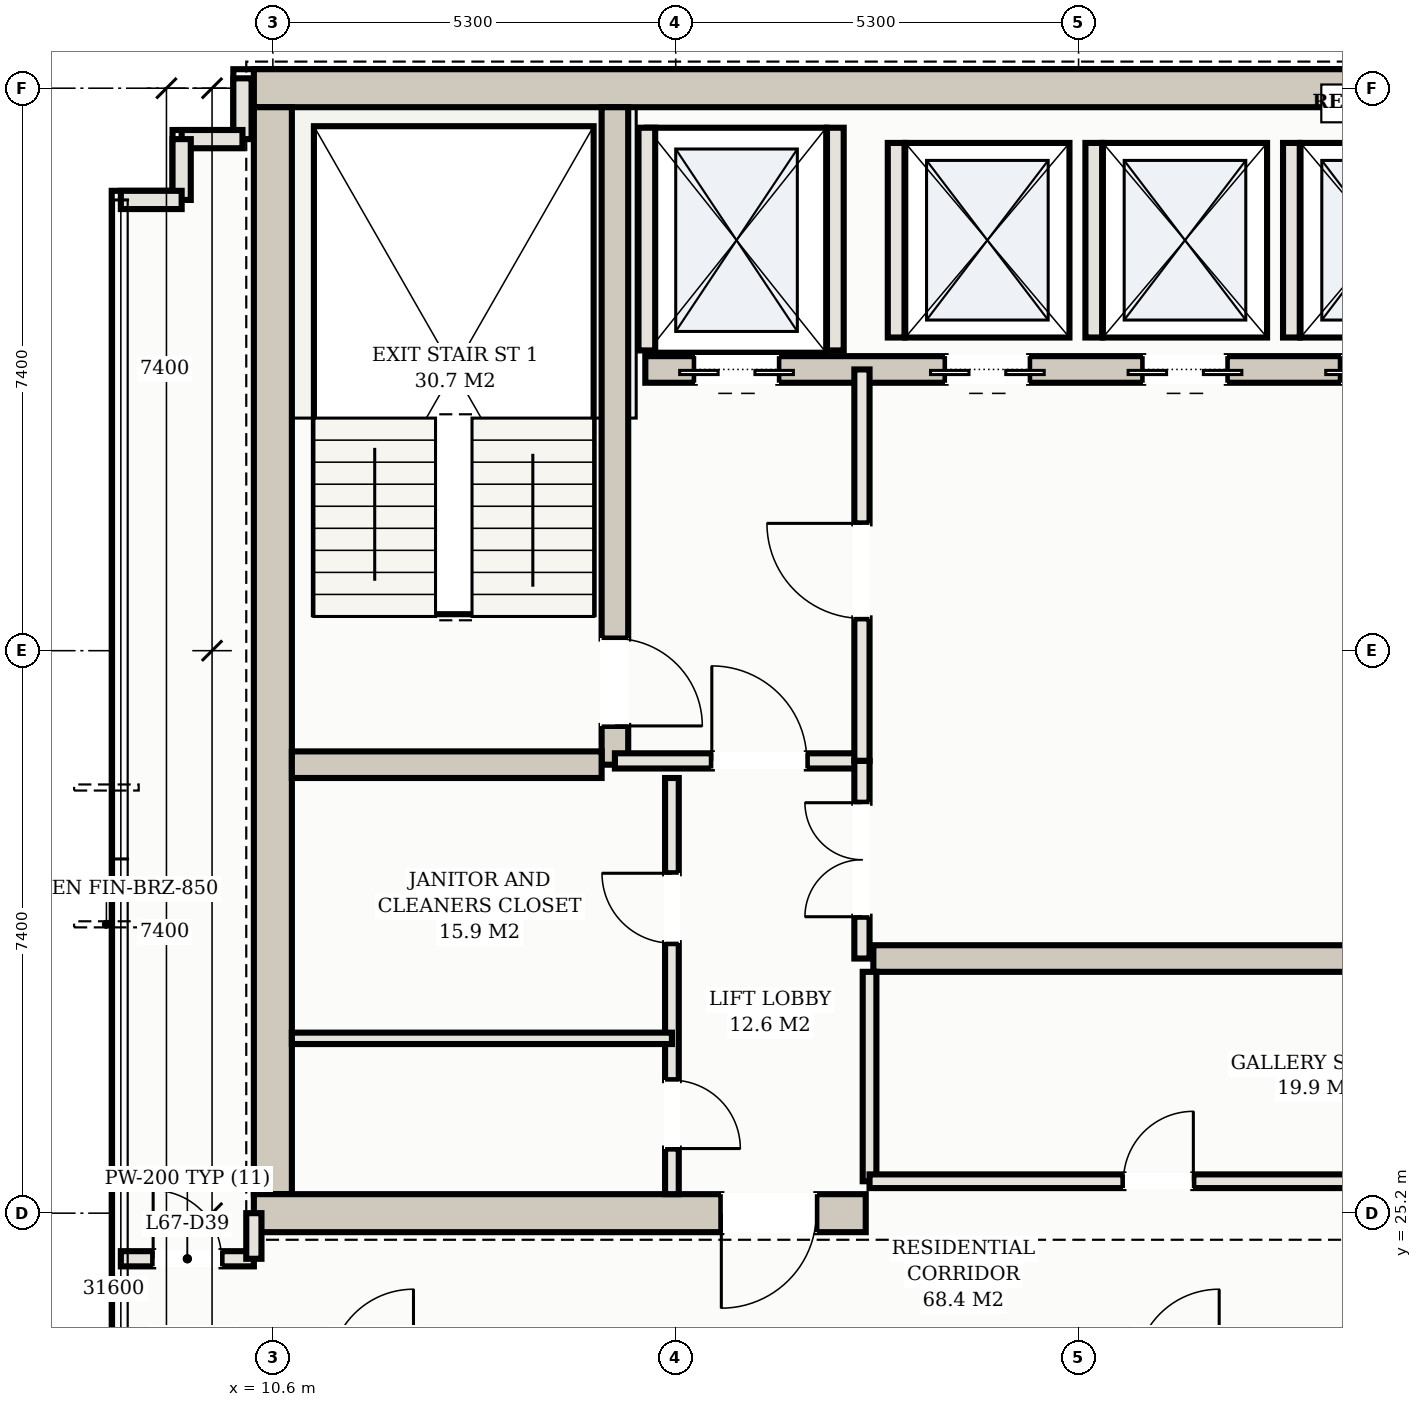
"""IFC4 building model, lengths in metres.
Left out: names, types, materials, properties, quantities, classifications, styles, units other than length and angle.
Written with IfcOpenShell. Run it as: python <this file> out.ifc"""

import sys

from ifc_helpers import new_model, si_unit, direction, frame, frame_2d, origin, place, context, subcontext, project, spatial, rectangle, extrude, element, fill, save


model = new_model("IFC4")
c1 = context("Model", 3, precision=1e-05, world=origin(), true_north=direction((0.0, 1.0)))
c2 = subcontext(c1, "Body", "Model", "MODEL_VIEW")
j1 = project(units=[si_unit("LENGTHUNIT", "METRE"), si_unit("PLANEANGLEUNIT", "RADIAN")], contexts=[c1])
p1 = place(None, origin())
s1 = spatial("IfcSite", under=j1, at=p1, CompositionType="ELEMENT")
p2 = place(p1, origin())
s2 = spatial("IfcBuilding", under=s1, at=p2, CompositionType="ELEMENT")
p3 = place(p2, frame((0.0, 0.0, 242.9)))
s3 = spatial("IfcBuildingStorey", under=s2, at=p3, CompositionType="ELEMENT", Elevation=242.9)
p4 = place(p3, frame((10.35, 40.0, 0.0), z_axis=(0.0, 0.0, 1.0), x_axis=(1.0, 0.0, 0.0)))
e1 = element("IfcWall", 1, at=p4, inside=s3, PredefinedType="SHEAR", context=c2, shape_type="SweptSolid", body=[
    extrude(rectangle(XDim=32.3, YDim=0.5, at=frame_2d((16.15, 0.0))), origin(), (0.0, 0.0, 1.0), 3.11),
])
p5 = place(p3, frame((10.6, 25.45, 0.0), z_axis=(0.0, 0.0, 1.0), x_axis=(0.0, 1.0, 0.0)))
e2 = element("IfcWall", 2, at=p5, inside=s3, PredefinedType="SHEAR", context=c2, shape_type="SweptSolid", body=[
    extrude(rectangle(XDim=14.3, YDim=0.5, at=frame_2d((7.15, 0.0))), origin(), (0.0, 0.0, 1.0), 3.11),
])
p6 = place(p3, frame((10.35, 25.2, 0.0), z_axis=(0.0, 0.0, 1.0), x_axis=(1.0, 0.0, 0.0)))
e3 = element("IfcWall", 3, at=p6, inside=s3, PredefinedType="SHEAR", context=c2, shape_type="SweptSolid", body=[
    extrude(rectangle(XDim=8.05, YDim=0.5, at=frame_2d((4.025, 0.0))), origin(), (0.0, 0.0, 1.0), 3.11),
])
p7 = place(p6, frame((6.15, 0.0, 0.0)))
e4 = element("IfcOpeningElement", 4, at=p7, cuts=e3, PredefinedType="OPENING", context=c2, shape_type="SweptSolid", body=[
    extrude(rectangle(XDim=1.25, YDim=2.2, at=frame_2d((0.625, 1.1))), frame((0.0, 0.26, 0.0), z_axis=(0.0, -1.0, 0.0), x_axis=(1.0, 0.0, 0.0)), (0.0, 0.0, 1.0), 0.52),
])
p8 = place(p3, frame((15.1, 31.1, 0.0), z_axis=(0.0, 0.0, 1.0), x_axis=(0.0, 1.0, 0.0)))
e5 = element("IfcWall", 5, at=p8, inside=s3, PredefinedType="SHEAR", context=c2, shape_type="SweptSolid", body=[
    extrude(rectangle(XDim=8.65, YDim=0.35, at=frame_2d((4.325, 0.0))), origin(), (0.0, 0.0, 1.0), 3.11),
])
p9 = place(p8, frame((0.51, 0.0, 0.0)))
e6 = element("IfcOpeningElement", 6, at=p9, cuts=e5, PredefinedType="OPENING", context=c2, shape_type="SweptSolid", body=[
    extrude(rectangle(XDim=1.15, YDim=2.2, at=frame_2d((0.575, 1.1))), frame((0.0, 0.185, 0.0), z_axis=(0.0, -1.0, 0.0), x_axis=(1.0, 0.0, 0.0)), (0.0, 0.0, 1.0), 0.37),
])
p10 = place(p3, frame((10.85, 31.1, 0.0), z_axis=(0.0, 0.0, 1.0), x_axis=(1.0, 0.0, 0.0)))
e7 = element("IfcWall", 7, at=p10, inside=s3, PredefinedType="SHEAR", context=c2, shape_type="SweptSolid", body=[
    extrude(rectangle(XDim=4.075, YDim=0.35, at=frame_2d((2.038, 0.0))), origin(), (0.0, 0.0, 1.0), 3.11),
])
p11 = place(p3, frame((15.5, 36.3, 0.0), z_axis=(0.0, 0.0, 1.0), x_axis=(1.0, 0.0, 0.0)))
e8 = element("IfcWall", 8, at=p11, inside=s3, PredefinedType="SHEAR", context=c2, shape_type="SweptSolid", body=[
    extrude(rectangle(XDim=22.0, YDim=0.35, at=frame_2d((11.0, 0.0))), origin(), (0.0, 0.0, 1.0), 3.11),
])
p12 = place(p11, frame((0.65, 0.0, 0.0)))
e9 = element("IfcOpeningElement", 9, at=p12, cuts=e8, PredefinedType="OPENING", context=c2, shape_type="SweptSolid", body=[
    extrude(rectangle(XDim=1.1, YDim=2.15, at=frame_2d((0.55, 1.075))), frame((0.0, 0.185, 0.0), z_axis=(0.0, -1.0, 0.0), x_axis=(1.0, 0.0, 0.0)), (0.0, 0.0, 1.0), 0.37),
])
p13 = place(p11, frame((20.25, 0.0, 0.0)))
e10 = element("IfcOpeningElement", 10, at=p13, cuts=e8, PredefinedType="OPENING", context=c2, shape_type="SweptSolid", body=[
    extrude(rectangle(XDim=1.1, YDim=2.15, at=frame_2d((0.55, 1.075))), frame((0.0, 0.185, 0.0), z_axis=(0.0, -1.0, 0.0), x_axis=(1.0, 0.0, 0.0)), (0.0, 0.0, 1.0), 0.37),
])
p14 = place(p11, frame((17.05, 0.0, 0.0)))
e11 = element("IfcOpeningElement", 11, at=p14, cuts=e8, PredefinedType="OPENING", context=c2, shape_type="SweptSolid", body=[
    extrude(rectangle(XDim=1.3, YDim=2.2, at=frame_2d((0.65, 1.1))), frame((0.0, 0.185, 0.0), z_axis=(0.0, -1.0, 0.0), x_axis=(1.0, 0.0, 0.0)), (0.0, 0.0, 1.0), 0.37),
])
p15 = place(p11, frame((3.95, 0.0, 0.0)))
e12 = element("IfcOpeningElement", 12, at=p15, cuts=e8, PredefinedType="OPENING", context=c2, shape_type="SweptSolid", body=[
    extrude(rectangle(XDim=1.1, YDim=2.15, at=frame_2d((0.55, 1.075))), frame((0.0, 0.185, 0.0), z_axis=(0.0, -1.0, 0.0), x_axis=(1.0, 0.0, 0.0)), (0.0, 0.0, 1.0), 0.37),
])
p16 = place(p11, frame((6.55, 0.0, 0.0)))
e13 = element("IfcOpeningElement", 13, at=p16, cuts=e8, PredefinedType="OPENING", context=c2, shape_type="SweptSolid", body=[
    extrude(rectangle(XDim=1.1, YDim=2.15, at=frame_2d((0.55, 1.075))), frame((0.0, 0.185, 0.0), z_axis=(0.0, -1.0, 0.0), x_axis=(1.0, 0.0, 0.0)), (0.0, 0.0, 1.0), 0.37),
])
p17 = place(p11, frame((9.15, 0.0, 0.0)))
e14 = element("IfcOpeningElement", 14, at=p17, cuts=e8, PredefinedType="OPENING", context=c2, shape_type="SweptSolid", body=[
    extrude(rectangle(XDim=1.1, YDim=2.15, at=frame_2d((0.55, 1.075))), frame((0.0, 0.185, 0.0), z_axis=(0.0, -1.0, 0.0), x_axis=(1.0, 0.0, 0.0)), (0.0, 0.0, 1.0), 0.37),
])
p18 = place(p3, frame((18.5, 28.55, 0.0), z_axis=(0.0, 0.0, 1.0), x_axis=(1.0, 0.0, 0.0)))
e15 = element("IfcWall", 15, at=p18, inside=s3, PredefinedType="SHEAR", context=c2, shape_type="SweptSolid", body=[
    extrude(rectangle(XDim=16.0, YDim=0.35, at=frame_2d((8.0, 0.0))), origin(), (0.0, 0.0, 1.0), 3.11),
])
for number, where, z_axis, x_axis in (
    (16, (15.52, 36.55, 0.0), (0.0, 0.0, 1.0), (0.0, 1.0, 0.0)),
    (17, (18.0, 36.55, 0.0), (0.0, 0.0, 1.0), (0.0, 1.0, 0.0)),
):
    element("IfcWall", number, at=place(p3, frame(where, z_axis=z_axis, x_axis=x_axis)), inside=s3, PredefinedType="SOLIDWALL", context=c2, shape_type="SweptSolid", body=[
        extrude(rectangle(XDim=2.93, YDim=0.22, at=frame_2d((1.465, 0.0))), origin(), (0.0, 0.0, 1.0), 3.11),
    ])
for number, where, z_axis, x_axis in (
    (18, (18.8, 36.72, 0.0), (0.0, 0.0, 1.0), (0.0, 1.0, 0.0)),
    (19, (21.4, 36.72, 0.0), (0.0, 0.0, 1.0), (0.0, 1.0, 0.0)),
    (20, (24.0, 36.72, 0.0), (0.0, 0.0, 1.0), (0.0, 1.0, 0.0)),
):
    element("IfcWall", number, at=place(p3, frame(where, z_axis=z_axis, x_axis=x_axis)), inside=s3, PredefinedType="SOLIDWALL", context=c2, shape_type="SweptSolid", body=[
        extrude(rectangle(XDim=2.56, YDim=0.22, at=frame_2d((1.28, 0.0))), origin(), (0.0, 0.0, 1.0), 3.11),
    ])
p19 = place(p3, frame((10.2, 40.13, 0.0), z_axis=(0.0, 0.0, 1.0), x_axis=(0.0, -1.0, 0.0)))
e21 = element("IfcWall", 21, at=p19, inside=s3, PredefinedType="SOLIDWALL", context=c2, shape_type="SweptSolid", body=[
    extrude(rectangle(XDim=0.8, YDim=0.24, at=frame_2d((0.4, 0.0))), origin(), (0.0, 0.0, 1.0), 3.11),
])
for number, where, z_axis, x_axis in (
    (22, (10.2, 39.33, 0.0), (0.0, 0.0, 1.0), (-1.0, 0.0, 0.0)),
    (23, (9.4, 39.33, 0.0), (0.0, 0.0, 1.0), (0.0, -1.0, 0.0)),
):
    element("IfcWall", number, at=place(p3, frame(where, z_axis=z_axis, x_axis=x_axis)), inside=s3, PredefinedType="SOLIDWALL", context=c2, shape_type="SweptSolid", body=[
        extrude(rectangle(XDim=0.8, YDim=0.24, at=frame_2d((0.4, 0.0))), origin(), (0.0, 0.0, 1.0), 3.11),
    ])
p20 = place(p3, frame((9.4, 38.53, 0.0), z_axis=(0.0, 0.0, 1.0), x_axis=(-1.0, 0.0, 0.0)))
e24 = element("IfcWall", 24, at=p20, inside=s3, PredefinedType="SOLIDWALL", context=c2, shape_type="SweptSolid", body=[
    extrude(rectangle(XDim=0.8, YDim=0.24, at=frame_2d((0.4, 0.0))), origin(), (0.0, 0.0, 1.0), 3.11),
])
p21 = place(p3, frame((15.1, 31.15, 0.0), z_axis=(0.0, 0.0, 1.0), x_axis=(1.0, 0.0, 0.0)))
e25 = element("IfcWall", 25, at=p21, inside=s3, PredefinedType="PARTITIONING", context=c2, shape_type="SweptSolid", body=[
    extrude(rectangle(XDim=3.25, YDim=0.2, at=frame_2d((1.625, 0.0))), origin(), (0.0, 0.0, 1.0), 2.45),
])
p22 = place(p21, frame((1.275, 0.0, 0.0)))
e26 = element("IfcOpeningElement", 26, at=p22, cuts=e25, PredefinedType="OPENING", context=c2, shape_type="SweptSolid", body=[
    extrude(rectangle(XDim=1.25, YDim=2.2, at=frame_2d((0.625, 1.1))), frame((0.0, 0.11, 0.0), z_axis=(0.0, -1.0, 0.0), x_axis=(1.0, 0.0, 0.0)), (0.0, 0.0, 1.0), 0.22),
])
p23 = place(p3, frame((18.35, 31.15, 0.0), z_axis=(0.0, 0.0, 1.0), x_axis=(0.0, 1.0, 0.0)))
e27 = element("IfcWall", 27, at=p23, inside=s3, PredefinedType="PARTITIONING", context=c2, shape_type="SweptSolid", body=[
    extrude(rectangle(XDim=5.15, YDim=0.2, at=frame_2d((2.575, 0.0))), origin(), (0.0, 0.0, 1.0), 2.45),
])
p24 = place(p23, frame((1.875, 0.0, 0.0)))
e28 = element("IfcOpeningElement", 28, at=p24, cuts=e27, PredefinedType="OPENING", context=c2, shape_type="SweptSolid", body=[
    extrude(rectangle(XDim=1.25, YDim=2.2, at=frame_2d((0.625, 1.1))), frame((0.0, 0.11, 0.0), z_axis=(0.0, -1.0, 0.0), x_axis=(1.0, 0.0, 0.0)), (0.0, 0.0, 1.0), 0.22),
])
p25 = place(p3, frame((15.85, 25.45, 0.0), z_axis=(0.0, 0.0, 1.0), x_axis=(0.0, 1.0, 0.0)))
e29 = element("IfcWall", 29, at=p25, inside=s3, PredefinedType="PARTITIONING", context=c2, shape_type="SweptSolid", body=[
    extrude(rectangle(XDim=5.475, YDim=0.18, at=frame_2d((2.738, 0.0))), origin(), (0.0, 0.0, 1.0), 2.45),
])
p26 = place(p25, frame((0.6, 0.0, 0.0)))
e30 = element("IfcOpeningElement", 30, at=p26, cuts=e29, PredefinedType="OPENING", context=c2, shape_type="SweptSolid", body=[
    extrude(rectangle(XDim=0.9, YDim=2.15, at=frame_2d((0.45, 1.075))), frame((0.0, 0.1, 0.0), z_axis=(0.0, -1.0, 0.0), x_axis=(1.0, 0.0, 0.0)), (0.0, 0.0, 1.0), 0.2),
])
p27 = place(p25, frame((3.302, 0.0, 0.0)))
e31 = element("IfcOpeningElement", 31, at=p27, cuts=e29, PredefinedType="OPENING", context=c2, shape_type="SweptSolid", body=[
    extrude(rectangle(XDim=0.92, YDim=2.15, at=frame_2d((0.46, 1.075))), frame((0.0, 0.1, 0.0), z_axis=(0.0, -1.0, 0.0), x_axis=(1.0, 0.0, 0.0)), (0.0, 0.0, 1.0), 0.2),
])
p28 = place(p3, frame((10.85, 27.5, 0.0), z_axis=(0.0, 0.0, 1.0), x_axis=(1.0, 0.0, 0.0)))
e32 = element("IfcWall", 32, at=p28, inside=s3, PredefinedType="PARTITIONING", context=c2, shape_type="SweptSolid", body=[
    extrude(rectangle(XDim=5.0, YDim=0.15, at=frame_2d((2.5, 0.0))), origin(), (0.0, 0.0, 1.0), 2.45),
])
p29 = place(p3, frame((18.35, 28.55, 0.0), z_axis=(0.0, 0.0, 1.0), x_axis=(0.0, 1.0, 0.0)))
e33 = element("IfcWall", 33, at=p29, inside=s3, PredefinedType="PARTITIONING", context=c2, shape_type="SweptSolid", body=[
    extrude(rectangle(XDim=2.6, YDim=0.2, at=frame_2d((1.3, 0.0))), origin(), (0.0, 0.0, 1.0), 2.45),
])
p30 = place(p29, frame((0.55, 0.0, 0.0)))
e34 = element("IfcOpeningElement", 34, at=p30, cuts=e33, PredefinedType="OPENING", context=c2, shape_type="SweptSolid", body=[
    extrude(rectangle(XDim=1.5, YDim=2.25, at=frame_2d((0.75, 1.125))), frame((0.0, 0.11, 0.0), z_axis=(0.0, -1.0, 0.0), x_axis=(1.0, 0.0, 0.0)), (0.0, 0.0, 1.0), 0.22),
])
p31 = place(p3, frame((18.45, 25.62, 0.0), z_axis=(0.0, 0.0, 1.0), x_axis=(0.0, 1.0, 0.0)))
e35 = element("IfcWall", 35, at=p31, inside=s3, PredefinedType="PARTITIONING", context=c2, shape_type="SweptSolid", body=[
    extrude(rectangle(XDim=2.755, YDim=0.18, at=frame_2d((1.377, 0.0))), origin(), (0.0, 0.0, 1.0), 2.45),
])
p32 = place(p3, frame((18.45, 25.62, 0.0), z_axis=(0.0, 0.0, 1.0), x_axis=(1.0, 0.0, 0.0)))
e36 = element("IfcWall", 36, at=p32, inside=s3, PredefinedType="PARTITIONING", context=c2, shape_type="SweptSolid", body=[
    extrude(rectangle(XDim=7.9, YDim=0.18, at=frame_2d((3.95, 0.0))), origin(), (0.0, 0.0, 1.0), 2.45),
])
p33 = place(p32, frame((3.34, 0.0, 0.0)))
e37 = element("IfcOpeningElement", 37, at=p33, cuts=e36, PredefinedType="OPENING", context=c2, shape_type="SweptSolid", body=[
    extrude(rectangle(XDim=0.92, YDim=2.15, at=frame_2d((0.46, 1.075))), frame((0.0, 0.1, 0.0), z_axis=(0.0, -1.0, 0.0), x_axis=(1.0, 0.0, 0.0)), (0.0, 0.0, 1.0), 0.2),
])
p34 = place(p3, frame((8.6, 24.6, 0.0), z_axis=(0.0, 0.0, 1.0), x_axis=(1.0, 0.0, 0.0)))
e38 = element("IfcWall", 38, at=p34, inside=s3, PredefinedType="PARTITIONING", context=c2, shape_type="SweptSolid", body=[
    extrude(rectangle(XDim=1.75, YDim=0.2, at=frame_2d((0.875, 0.0))), origin(), (0.0, 0.0, 1.0), 2.45),
])
p35 = place(p34, frame((0.425, 0.0, 0.0)))
e39 = element("IfcOpeningElement", 39, at=p35, cuts=e38, PredefinedType="OPENING", context=c2, shape_type="SweptSolid", body=[
    extrude(rectangle(XDim=0.9, YDim=2.15, at=frame_2d((0.45, 1.075))), frame((0.0, 0.11, 0.0), z_axis=(0.0, -1.0, 0.0), x_axis=(1.0, 0.0, 0.0)), (0.0, 0.0, 1.0), 0.22),
])
p36 = place(p3, frame((10.35, 24.6, 0.0), z_axis=(0.0, 0.0, 1.0), x_axis=(0.0, 1.0, 0.0)))
e40 = element("IfcWall", 40, at=p36, inside=s3, PredefinedType="PARTITIONING", context=c2, shape_type="SweptSolid", body=[
    extrude(rectangle(XDim=0.6, YDim=0.2, at=frame_2d((0.3, 0.0))), origin(), (0.0, 0.0, 1.0), 2.45),
])
p37 = place(p12, frame((1.1, 0.0, 0.0), z_axis=(0.0, 0.0, 1.0), x_axis=(-1.0, 0.0, 0.0)))
e41 = element("IfcDoor", 41, at=p37, inside=s3, OperationType="DOUBLE_DOOR_SLIDING", PredefinedType="DOOR", context=c2, shape_type="SweptSolid", body=[
    extrude(rectangle(XDim=1.1, YDim=2.15, at=frame_2d((0.55, 1.075))), frame((0.0, 0.025, 0.0), z_axis=(0.0, -1.0, 0.0), x_axis=(1.0, 0.0, 0.0)), (0.0, 0.0, 1.0), 0.05),
])
fill(e9, e41)
p38 = place(p15, frame((1.1, 0.0, 0.0), z_axis=(0.0, 0.0, 1.0), x_axis=(-1.0, 0.0, 0.0)))
e42 = element("IfcDoor", 42, at=p38, inside=s3, OperationType="DOUBLE_DOOR_SLIDING", PredefinedType="DOOR", context=c2, shape_type="SweptSolid", body=[
    extrude(rectangle(XDim=1.1, YDim=2.15, at=frame_2d((0.55, 1.075))), frame((0.0, 0.025, 0.0), z_axis=(0.0, -1.0, 0.0), x_axis=(1.0, 0.0, 0.0)), (0.0, 0.0, 1.0), 0.05),
])
fill(e12, e42)
p39 = place(p16, frame((1.1, 0.0, 0.0), z_axis=(0.0, 0.0, 1.0), x_axis=(-1.0, 0.0, 0.0)))
e43 = element("IfcDoor", 43, at=p39, inside=s3, OperationType="DOUBLE_DOOR_SLIDING", PredefinedType="DOOR", context=c2, shape_type="SweptSolid", body=[
    extrude(rectangle(XDim=1.1, YDim=2.15, at=frame_2d((0.55, 1.075))), frame((0.0, 0.025, 0.0), z_axis=(0.0, -1.0, 0.0), x_axis=(1.0, 0.0, 0.0)), (0.0, 0.0, 1.0), 0.05),
])
fill(e13, e43)
p40 = place(p17, frame((1.1, 0.0, 0.0), z_axis=(0.0, 0.0, 1.0), x_axis=(-1.0, 0.0, 0.0)))
e44 = element("IfcDoor", 44, at=p40, inside=s3, OperationType="DOUBLE_DOOR_SLIDING", PredefinedType="DOOR", context=c2, shape_type="SweptSolid", body=[
    extrude(rectangle(XDim=1.1, YDim=2.15, at=frame_2d((0.55, 1.075))), frame((0.0, 0.025, 0.0), z_axis=(0.0, -1.0, 0.0), x_axis=(1.0, 0.0, 0.0)), (0.0, 0.0, 1.0), 0.05),
])
fill(e14, e44)
p41 = place(p7, frame((1.25, 0.0, 0.0), z_axis=(0.0, 0.0, 1.0), x_axis=(-1.0, 0.0, 0.0)))
e45 = element("IfcDoor", 45, at=p41, inside=s3, OperationType="SINGLE_SWING_RIGHT", PredefinedType="DOOR", context=c2, shape_type="SweptSolid", body=[
    extrude(rectangle(XDim=1.25, YDim=2.2, at=frame_2d((0.625, 1.1))), frame((0.0, 0.025, 0.0), z_axis=(0.0, -1.0, 0.0), x_axis=(1.0, 0.0, 0.0)), (0.0, 0.0, 1.0), 0.05),
])
fill(e4, e45)
p42 = place(p22, origin())
e46 = element("IfcDoor", 46, at=p42, inside=s3, OperationType="SINGLE_SWING_LEFT", PredefinedType="DOOR", context=c2, shape_type="SweptSolid", body=[
    extrude(rectangle(XDim=1.25, YDim=2.2, at=frame_2d((0.625, 1.1))), frame((0.0, 0.025, 0.0), z_axis=(0.0, -1.0, 0.0), x_axis=(1.0, 0.0, 0.0)), (0.0, 0.0, 1.0), 0.05),
])
fill(e26, e46)
p43 = place(p24, origin())
e47 = element("IfcDoor", 47, at=p43, inside=s3, OperationType="SINGLE_SWING_RIGHT", PredefinedType="DOOR", context=c2, shape_type="SweptSolid", body=[
    extrude(rectangle(XDim=1.25, YDim=2.2, at=frame_2d((0.625, 1.1))), frame((0.0, 0.025, 0.0), z_axis=(0.0, -1.0, 0.0), x_axis=(1.0, 0.0, 0.0)), (0.0, 0.0, 1.0), 0.05),
])
fill(e28, e47)
p44 = place(p9, frame((1.15, 0.0, 0.0), z_axis=(0.0, 0.0, 1.0), x_axis=(-1.0, 0.0, 0.0)))
e48 = element("IfcDoor", 48, at=p44, inside=s3, OperationType="SINGLE_SWING_RIGHT", PredefinedType="DOOR", context=c2, shape_type="SweptSolid", body=[
    extrude(rectangle(XDim=1.15, YDim=2.2, at=frame_2d((0.575, 1.1))), frame((0.0, 0.025, 0.0), z_axis=(0.0, -1.0, 0.0), x_axis=(1.0, 0.0, 0.0)), (0.0, 0.0, 1.0), 0.05),
])
fill(e6, e48)
p45 = place(p26, frame((0.9, 0.0, 0.0), z_axis=(0.0, 0.0, 1.0), x_axis=(-1.0, 0.0, 0.0)))
e49 = element("IfcDoor", 49, at=p45, inside=s3, OperationType="SINGLE_SWING_RIGHT", PredefinedType="DOOR", context=c2, shape_type="SweptSolid", body=[
    extrude(rectangle(XDim=0.9, YDim=2.15, at=frame_2d((0.45, 1.075))), frame((0.0, 0.025, 0.0), z_axis=(0.0, -1.0, 0.0), x_axis=(1.0, 0.0, 0.0)), (0.0, 0.0, 1.0), 0.05),
])
fill(e30, e49)
p46 = place(p27, origin())
e50 = element("IfcDoor", 50, at=p46, inside=s3, OperationType="SINGLE_SWING_RIGHT", PredefinedType="DOOR", context=c2, shape_type="SweptSolid", body=[
    extrude(rectangle(XDim=0.92, YDim=2.15, at=frame_2d((0.46, 1.075))), frame((0.0, 0.025, 0.0), z_axis=(0.0, -1.0, 0.0), x_axis=(1.0, 0.0, 0.0)), (0.0, 0.0, 1.0), 0.05),
])
fill(e31, e50)
p47 = place(p30, origin())
e51 = element("IfcDoor", 51, at=p47, inside=s3, OperationType="DOUBLE_DOOR_SINGLE_SWING", PredefinedType="DOOR", context=c2, shape_type="SweptSolid", body=[
    extrude(rectangle(XDim=1.5, YDim=2.25, at=frame_2d((0.75, 1.125))), frame((0.0, 0.025, 0.0), z_axis=(0.0, -1.0, 0.0), x_axis=(1.0, 0.0, 0.0)), (0.0, 0.0, 1.0), 0.05),
])
fill(e34, e51)
p48 = place(p33, origin())
e52 = element("IfcDoor", 52, at=p48, inside=s3, OperationType="SINGLE_SWING_RIGHT", PredefinedType="DOOR", context=c2, shape_type="SweptSolid", body=[
    extrude(rectangle(XDim=0.92, YDim=2.15, at=frame_2d((0.46, 1.075))), frame((0.0, 0.025, 0.0), z_axis=(0.0, -1.0, 0.0), x_axis=(1.0, 0.0, 0.0)), (0.0, 0.0, 1.0), 0.05),
])
fill(e37, e52)
p49 = place(p35, origin())
e53 = element("IfcDoor", 53, at=p49, inside=s3, OperationType="SINGLE_SWING_LEFT", PredefinedType="DOOR", context=c2, shape_type="SweptSolid", body=[
    extrude(rectangle(XDim=0.9, YDim=2.15, at=frame_2d((0.45, 1.075))), frame((0.0, 0.025, 0.0), z_axis=(0.0, -1.0, 0.0), x_axis=(1.0, 0.0, 0.0)), (0.0, 0.0, 1.0), 0.05),
])
fill(e39, e53)
save(model, sys.argv[1])
